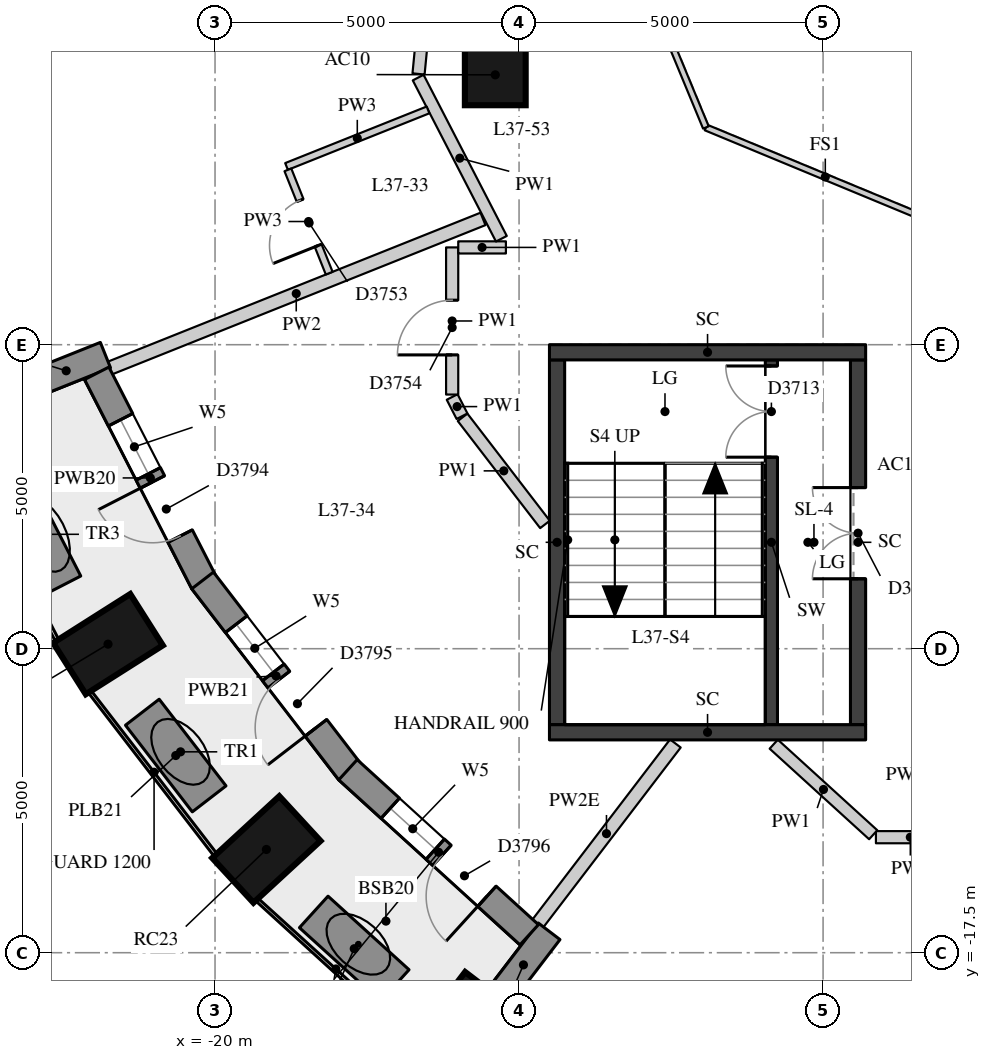
"""IFC4 building model, lengths in metres.
Left out: names, types, materials, properties, quantities, classifications, styles, units other than length and angle.
Written with IfcOpenShell. Run it as: python <this file> out.ifc"""

import sys

from ifc_helpers import new_model, si_unit, direction, frame, frame_2d, origin, origin_2d, place, context, subcontext, project, spatial, rectangle, extrude, element, fill, save


model = new_model("IFC4")
c1 = context("Model", 3, precision=1e-05, world=origin(), true_north=direction((0.0, 1.0)))
c2 = subcontext(c1, "Body", "Model", "MODEL_VIEW")
j1 = project(units=[si_unit("LENGTHUNIT", "METRE"), si_unit("PLANEANGLEUNIT", "RADIAN")], contexts=[c1])
p1 = place(None, origin())
s1 = spatial("IfcSite", under=j1, at=p1, CompositionType="ELEMENT")
p2 = place(p1, origin())
s2 = spatial("IfcBuilding", under=s1, at=p2, CompositionType="ELEMENT")
p3 = place(p2, frame((0.0, 0.0, 131.8)))
s3 = spatial("IfcBuildingStorey", under=s2, at=p3, CompositionType="ELEMENT", Elevation=131.8)
for number, where, z_axis, x_axis in (
    (1, (-21.76, -12.425, 0.0), (0.0, 0.0, 1.0), (-0.845, -0.536, 0.0)),
    (2, (-19.156, -15.802, 0.0), (0.0, 0.0, 1.0), (-0.735, -0.678, 0.0)),
    (3, (-15.945, -18.717, 0.0), (0.0, 0.0, 1.0), (-0.607, -0.795, 0.0)),
):
    element("IfcColumn", number, at=place(p3, frame(where, z_axis=z_axis, x_axis=x_axis)), inside=s3, PredefinedType="COLUMN", context=c2, shape_type="SweptSolid", body=[
        extrude(rectangle(XDim=1.5, YDim=1.0, at=origin_2d()), origin(), (0.0, 0.0, 1.0), 3.3),
    ])
p4 = place(p3, frame((-15.391, -3.062, 0.0), z_axis=(0.0, 0.0, 1.0), x_axis=(1.0, 0.0, 0.0)))
e4 = element("IfcColumn", 4, at=p4, inside=s3, PredefinedType="COLUMN", context=c2, shape_type="SweptSolid", body=[
    extrude(rectangle(XDim=1.0, YDim=1.0, at=origin_2d()), origin(), (0.0, 0.0, 1.0), 3.3),
])
p5 = place(p3, frame((-23.093, -8.187, 0.0), z_axis=(0.0, 0.0, 1.0), x_axis=(0.928549333349, 0.371209018665, 0.0)))
e5 = element("IfcWall", 5, at=p5, inside=s3, PredefinedType="SOLIDWALL", context=c2, shape_type="SweptSolid", body=[
    extrude(rectangle(XDim=1.39, YDim=0.45, at=frame_2d((0.695, 0.0))), origin(), (0.0, 0.0, 1.0), 2.85),
])
p6 = place(p3, frame((-15.35, -18.253, 0.0), z_axis=(0.0, 0.0, 1.0), x_axis=(0.607026495834, 0.794681592435, 0.0)))
e6 = element("IfcWall", 6, at=p6, inside=s3, PredefinedType="SOLIDWALL", context=c2, shape_type="SweptSolid", body=[
    extrude(rectangle(XDim=1.391, YDim=0.45, at=frame_2d((0.695, 0.0))), origin(), (0.0, 0.0, 1.0), 2.4),
])
p7 = place(p3, frame((-21.945, -7.97, 0.0), z_axis=(0.0, 0.0, 1.0), x_axis=(0.455905146579, -0.89002836883, 0.0)))
e7 = element("IfcWall", 7, at=p7, inside=s3, PredefinedType="SOLIDWALL", context=c2, shape_type="SweptSolid", body=[
    extrude(rectangle(XDim=3.867, YDim=0.45, at=frame_2d((1.934, 0.0))), origin(), (0.0, 0.0, 1.0), 2.85),
])
p8 = place(p7, frame((0.858, 0.0, 0.4)))
e8 = element("IfcOpeningElement", 8, at=p8, cuts=e7, PredefinedType="OPENING", context=c2, shape_type="SweptSolid", body=[
    extrude(rectangle(XDim=1.0, YDim=1.75, at=frame_2d((0.5, 0.875))), frame((0.0, 0.235, 0.0), z_axis=(0.0, -1.0, 0.0), x_axis=(1.0, 0.0, 0.0)), (0.0, 0.0, 1.0), 0.47),
])
p9 = place(p7, frame((2.009, 0.0, 0.0)))
e9 = element("IfcOpeningElement", 9, at=p9, cuts=e7, PredefinedType="OPENING", context=c2, shape_type="SweptSolid", body=[
    extrude(rectangle(XDim=1.0, YDim=2.15, at=frame_2d((0.5, 1.075))), frame((0.0, 0.235, 0.0), z_axis=(0.0, -1.0, 0.0), x_axis=(1.0, 0.0, 0.0)), (0.0, 0.0, 1.0), 0.47),
])
p10 = place(p3, frame((-20.204, -11.377, 0.0), z_axis=(0.0, 0.0, 1.0), x_axis=(0.609698858135, -0.792633144897, 0.0)))
e10 = element("IfcWall", 10, at=p10, inside=s3, PredefinedType="SOLIDWALL", context=c2, shape_type="SweptSolid", body=[
    extrude(rectangle(XDim=3.965, YDim=0.45, at=frame_2d((1.982, 0.0))), origin(), (0.0, 0.0, 1.0), 2.85),
])
p11 = place(p10, frame((0.907, 0.0, 0.4)))
e11 = element("IfcOpeningElement", 11, at=p11, cuts=e10, PredefinedType="OPENING", context=c2, shape_type="SweptSolid", body=[
    extrude(rectangle(XDim=1.0, YDim=1.75, at=frame_2d((0.5, 0.875))), frame((0.0, 0.235, 0.0), z_axis=(0.0, -1.0, 0.0), x_axis=(1.0, 0.0, 0.0)), (0.0, 0.0, 1.0), 0.47),
])
p12 = place(p10, frame((2.058, 0.0, 0.0)))
e12 = element("IfcOpeningElement", 12, at=p12, cuts=e10, PredefinedType="OPENING", context=c2, shape_type="SweptSolid", body=[
    extrude(rectangle(XDim=1.0, YDim=2.15, at=frame_2d((0.5, 1.075))), frame((0.0, 0.235, 0.0), z_axis=(0.0, -1.0, 0.0), x_axis=(1.0, 0.0, 0.0)), (0.0, 0.0, 1.0), 0.47),
])
p13 = place(p3, frame((-17.814, -14.491, 0.0), z_axis=(0.0, 0.0, 1.0), x_axis=(0.73951517403, -0.673139886933, 0.0)))
e13 = element("IfcWall", 13, at=p13, inside=s3, PredefinedType="SOLIDWALL", context=c2, shape_type="SweptSolid", body=[
    extrude(rectangle(XDim=4.031, YDim=0.45, at=frame_2d((2.016, 0.0))), origin(), (0.0, 0.0, 1.0), 2.85),
])
p14 = place(p13, frame((0.941, 0.0, 0.4)))
e14 = element("IfcOpeningElement", 14, at=p14, cuts=e13, PredefinedType="OPENING", context=c2, shape_type="SweptSolid", body=[
    extrude(rectangle(XDim=1.0, YDim=1.75, at=frame_2d((0.5, 0.875))), frame((0.0, 0.235, 0.0), z_axis=(0.0, -1.0, 0.0), x_axis=(1.0, 0.0, 0.0)), (0.0, 0.0, 1.0), 0.47),
])
p15 = place(p13, frame((2.091, 0.0, 0.0)))
e15 = element("IfcOpeningElement", 15, at=p15, cuts=e13, PredefinedType="OPENING", context=c2, shape_type="SweptSolid", body=[
    extrude(rectangle(XDim=1.0, YDim=2.15, at=frame_2d((0.5, 1.075))), frame((0.0, 0.235, 0.0), z_axis=(0.0, -1.0, 0.0), x_axis=(1.0, 0.0, 0.0)), (0.0, 0.0, 1.0), 0.47),
])
p16 = place(p3, frame((-23.342, -9.864, 0.0), z_axis=(0.0, 0.0, 1.0), x_axis=(0.456845298981, -0.88954616114, 0.0)))
e16 = element("IfcWall", 16, at=p16, inside=s3, PredefinedType="USERDEFINED", context=c2, shape_type="SweptSolid", body=[
    extrude(rectangle(XDim=1.8, YDim=0.7, at=frame_2d((0.9, 0.0))), origin(), (0.0, 0.0, 1.0), 0.75),
])
p17 = place(p3, frame((-21.196, -13.544, 0.0), z_axis=(0.0, 0.0, 1.0), x_axis=(0.610686846919, -0.791872196127, 0.0)))
e17 = element("IfcWall", 17, at=p17, inside=s3, PredefinedType="USERDEFINED", context=c2, shape_type="SweptSolid", body=[
    extrude(rectangle(XDim=1.8, YDim=0.7, at=frame_2d((0.9, 0.0))), origin(), (0.0, 0.0, 1.0), 0.75),
])
p18 = place(p3, frame((-18.377, -16.829, 0.0), z_axis=(0.0, 0.0, 1.0), x_axis=(0.740332755969, -0.6722405897, 0.0)))
e18 = element("IfcWall", 18, at=p18, inside=s3, PredefinedType="USERDEFINED", context=c2, shape_type="SweptSolid", body=[
    extrude(rectangle(XDim=1.8, YDim=0.7, at=frame_2d((0.9, 0.0))), origin(), (0.0, 0.0, 1.0), 0.75),
])
p19 = place(p3, frame((-10.85, -13.75, 0.0), z_axis=(0.0, 0.0, 1.0), x_axis=(0.0, 1.0, 0.0)))
e19 = element("IfcWall", 19, at=p19, inside=s3, PredefinedType="SHEAR", context=c2, shape_type="SweptSolid", body=[
    extrude(rectangle(XDim=6.0, YDim=0.2, at=frame_2d((3.0, 0.0))), origin(), (0.0, 0.0, 1.0), 2.85),
])
p20 = place(p19, frame((4.4, 0.0, 0.0)))
e20 = element("IfcOpeningElement", 20, at=p20, cuts=e19, PredefinedType="OPENING", context=c2, shape_type="SweptSolid", body=[
    extrude(rectangle(XDim=1.5, YDim=2.1, at=frame_2d((0.75, 1.05))), frame((0.0, 0.11, 0.0), z_axis=(0.0, -1.0, 0.0), x_axis=(1.0, 0.0, 0.0)), (0.0, 0.0, 1.0), 0.22),
])
p21 = place(p3, frame((-14.375, -13.75, -0.28), z_axis=(0.0, 0.0, 1.0), x_axis=(0.0, 1.0, 0.0)))
e21 = element("IfcWall", 21, at=p21, inside=s3, PredefinedType="SHEAR", context=c2, shape_type="SweptSolid", body=[
    extrude(rectangle(XDim=6.0, YDim=0.25, at=frame_2d((3.0, 0.0))), origin(), (0.0, 0.0, 1.0), 3.13),
])
p22 = place(p3, frame((-9.425, -13.75, -0.28), z_axis=(0.0, 0.0, 1.0), x_axis=(0.0, 1.0, 0.0)))
e22 = element("IfcWall", 22, at=p22, inside=s3, PredefinedType="SHEAR", context=c2, shape_type="SweptSolid", body=[
    extrude(rectangle(XDim=6.0, YDim=0.25, at=frame_2d((3.0, 0.0))), origin(), (0.0, 0.0, 1.0), 3.13),
])
p23 = place(p22, frame((2.4, 0.0, 0.28)))
e23 = element("IfcOpeningElement", 23, at=p23, cuts=e22, PredefinedType="OPENING", context=c2, shape_type="SweptSolid", body=[
    extrude(rectangle(XDim=1.5, YDim=2.1, at=frame_2d((0.75, 1.05))), frame((0.0, 0.135, 0.0), z_axis=(0.0, -1.0, 0.0), x_axis=(1.0, 0.0, 0.0)), (0.0, 0.0, 1.0), 0.27),
])
for number, where, z_axis, x_axis in (
    (24, (-14.5, -7.625, -0.28), (0.0, 0.0, 1.0), (1.0, 0.0, 0.0)),
    (25, (-14.5, -13.875, -0.28), (0.0, 0.0, 1.0), (1.0, 0.0, 0.0)),
):
    element("IfcWall", number, at=place(p3, frame(where, z_axis=z_axis, x_axis=x_axis)), inside=s3, PredefinedType="SHEAR", context=c2, shape_type="SweptSolid", body=[
        extrude(rectangle(XDim=5.2, YDim=0.25, at=frame_2d((2.6, 0.0))), origin(), (0.0, 0.0, 1.0), 3.13),
    ])
p24 = place(p3, frame((-14.573, -10.456, 0.0), z_axis=(0.0, 0.0, 1.0), x_axis=(-0.60967360535, 0.792652568872, 0.0)))
e26 = element("IfcWall", 26, at=p24, inside=s3, PredefinedType="PARTITIONING", context=c2, shape_type="SweptSolid", body=[
    extrude(rectangle(XDim=2.223, YDim=0.2, at=frame_2d((1.111, 0.0))), origin(), (0.0, 0.0, 1.0), 2.85),
])
p25 = place(p3, frame((-15.938, -8.676, 0.0), z_axis=(0.0, 0.0, 1.0), x_axis=(-0.456525695549, 0.889710227717, 0.0)))
e27 = element("IfcWall", 27, at=p25, inside=s3, PredefinedType="PARTITIONING", context=c2, shape_type="SweptSolid", body=[
    extrude(rectangle(XDim=0.356, YDim=0.2, at=frame_2d((0.178, 0.0))), origin(), (0.0, 0.0, 1.0), 2.85),
])
p26 = place(p3, frame((-16.1, -8.32, 0.0), z_axis=(0.0, 0.0, 1.0), x_axis=(0.0, 1.0, 0.0)))
e28 = element("IfcWall", 28, at=p26, inside=s3, PredefinedType="PARTITIONING", context=c2, shape_type="SweptSolid", body=[
    extrude(rectangle(XDim=2.42, YDim=0.2, at=frame_2d((1.21, 0.0))), origin(), (0.0, 0.0, 1.0), 2.85),
])
p27 = place(p26, frame((0.652, 0.0, 0.0)))
e29 = element("IfcOpeningElement", 29, at=p27, cuts=e28, PredefinedType="OPENING", context=c2, shape_type="SweptSolid", body=[
    extrude(rectangle(XDim=0.9, YDim=2.1, at=frame_2d((0.45, 1.05))), frame((0.0, 0.11, 0.0), z_axis=(0.0, -1.0, 0.0), x_axis=(1.0, 0.0, 0.0)), (0.0, 0.0, 1.0), 0.22),
])
p28 = place(p3, frame((-16.0, -5.9, 0.0), z_axis=(0.0, 0.0, 1.0), x_axis=(1.0, 0.0, 0.0)))
e30 = element("IfcWall", 30, at=p28, inside=s3, PredefinedType="PARTITIONING", context=c2, shape_type="SweptSolid", body=[
    extrude(rectangle(XDim=0.784, YDim=0.2, at=frame_2d((0.392, 0.0))), origin(), (0.0, 0.0, 1.0), 2.85),
])
p29 = place(p3, frame((-15.291, -5.757, 0.0), z_axis=(0.0, 0.0, 1.0), x_axis=(-0.45873256191, 0.888574384418, 0.0)))
e31 = element("IfcWall", 31, at=p29, inside=s3, PredefinedType="PARTITIONING", context=c2, shape_type="SweptSolid", body=[
    extrude(rectangle(XDim=2.983, YDim=0.2, at=frame_2d((1.491, 0.0))), origin(), (0.0, 0.0, 1.0), 2.85),
])
p30 = place(p3, frame((-16.653, -3.047, 0.0), z_axis=(0.0, 0.0, 1.0), x_axis=(0.096559879606, 0.995327177189, 0.0)))
e32 = element("IfcWall", 32, at=p30, inside=s3, PredefinedType="PARTITIONING", context=c2, shape_type="SweptSolid", body=[
    extrude(rectangle(XDim=7.449, YDim=0.2, at=frame_2d((3.724, 0.0))), origin(), (0.0, 0.0, 1.0), 2.35),
])
p31 = place(p30, frame((0.864, 0.0, 0.0)))
e33 = element("IfcOpeningElement", 33, at=p31, cuts=e32, PredefinedType="OPENING", context=c2, shape_type="SweptSolid", body=[
    extrude(rectangle(XDim=1.1, YDim=2.1, at=frame_2d((0.55, 1.05))), frame((0.0, 0.11, 0.0), z_axis=(0.0, -1.0, 0.0), x_axis=(1.0, 0.0, 0.0)), (0.0, 0.0, 1.0), 0.22),
])
p32 = place(p3, frame((-8.0, -15.6, 0.0), z_axis=(0.0, 0.0, 1.0), x_axis=(-1.0, 0.0, 0.0)))
e34 = element("IfcWall", 34, at=p32, inside=s3, PredefinedType="PARTITIONING", context=c2, shape_type="SweptSolid", body=[
    extrude(rectangle(XDim=1.131, YDim=0.2, at=frame_2d((0.565, 0.0))), origin(), (0.0, 0.0, 1.0), 2.85),
])
p33 = place(p3, frame((-9.176, -15.56, 0.0), z_axis=(0.0, 0.0, 1.0), x_axis=(-0.73943556447, 0.673227336044, 0.0)))
e35 = element("IfcWall", 35, at=p33, inside=s3, PredefinedType="PARTITIONING", context=c2, shape_type="SweptSolid", body=[
    extrude(rectangle(XDim=2.212, YDim=0.2, at=frame_2d((1.106, 0.0))), origin(), (0.0, 0.0, 1.0), 2.85),
])
p34 = place(p3, frame((-21.736, -7.887, 0.0), z_axis=(0.0, 0.0, 1.0), x_axis=(0.928547942842, 0.371212496884, 0.0)))
e36 = element("IfcWall", 36, at=p34, inside=s3, PredefinedType="PARTITIONING", context=c2, shape_type="SweptSolid", body=[
    extrude(rectangle(XDim=6.615, YDim=0.22, at=frame_2d((3.308, 0.0))), origin(), (0.0, 0.0, 1.0), 2.85),
])
p35 = place(p3, frame((-14.696, -17.025, 0.0), z_axis=(0.0, 0.0, 1.0), x_axis=(0.607059278405, 0.794656550028, 0.0)))
e37 = element("IfcWall", 37, at=p35, inside=s3, PredefinedType="PARTITIONING", context=c2, shape_type="SweptSolid", body=[
    extrude(rectangle(XDim=3.734, YDim=0.22, at=frame_2d((1.867, 0.0))), origin(), (0.0, 0.0, 1.0), 2.4),
])
p36 = place(p3, frame((-16.497, -3.638, 0.0), z_axis=(0.0, 0.0, 1.0), x_axis=(-0.92857071808, -0.371155522019, 0.0)))
e38 = element("IfcWall", 38, at=p36, inside=s3, PredefinedType="PARTITIONING", context=c2, shape_type="SweptSolid", body=[
    extrude(rectangle(XDim=2.506, YDim=0.12, at=frame_2d((1.253, 0.0))), origin(), (0.0, 0.0, 1.0), 2.85),
])
p37 = place(p3, frame((-18.802, -4.624, 0.0), z_axis=(0.0, 0.0, 1.0), x_axis=(0.371229680537, -0.928541073022, 0.0)))
e39 = element("IfcWall", 39, at=p37, inside=s3, PredefinedType="PARTITIONING", context=c2, shape_type="SweptSolid", body=[
    extrude(rectangle(XDim=1.83, YDim=0.12, at=frame_2d((0.915, 0.0))), origin(), (0.0, 0.0, 1.0), 2.85),
])
p38 = place(p37, frame((0.54, 0.0, 0.0)))
e40 = element("IfcOpeningElement", 40, at=p38, cuts=e39, PredefinedType="OPENING", context=c2, shape_type="SweptSolid", body=[
    extrude(rectangle(XDim=0.8, YDim=2.1, at=frame_2d((0.4, 1.05))), frame((0.0, 0.07, 0.0), z_axis=(0.0, -1.0, 0.0), x_axis=(1.0, 0.0, 0.0)), (0.0, 0.0, 1.0), 0.14),
])
for number, where, z_axis, x_axis in (
    (41, (-8.0, -5.554, 0.0), (0.0, 0.0, 1.0), (-0.924, 0.383, 0.0)),
    (42, (-11.927, -3.927, 0.0), (0.0, 0.0, 1.0), (-0.383, 0.924, 0.0)),
):
    element("IfcWall", number, at=place(p3, frame(where, z_axis=z_axis, x_axis=x_axis)), inside=s3, PredefinedType="PARTITIONING", context=c2, shape_type="SweptSolid", body=[
        extrude(rectangle(XDim=4.251, YDim=0.1, at=frame_2d((2.125, 0.0))), origin(), (0.0, 0.0, 1.0), 2.85),
    ])
p39 = place(p8, origin())
e43 = element("IfcWindow", 43, at=p39, inside=s3, PartitioningType="SINGLE_PANEL", PredefinedType="WINDOW", context=c2, shape_type="SweptSolid", body=[
    extrude(rectangle(XDim=1.0, YDim=1.75, at=frame_2d((0.5, 0.875))), frame((0.0, 0.035, 0.0), z_axis=(0.0, -1.0, 0.0), x_axis=(1.0, 0.0, 0.0)), (0.0, 0.0, 1.0), 0.06),
])
fill(e8, e43)
p40 = place(p9, frame((1.0, 0.0, 0.0), z_axis=(0.0, 0.0, 1.0), x_axis=(-1.0, 0.0, 0.0)))
e44 = element("IfcDoor", 44, at=p40, inside=s3, OperationType="SINGLE_SWING_RIGHT", PredefinedType="DOOR", context=c2, shape_type="SweptSolid", body=[
    extrude(rectangle(XDim=1.0, YDim=2.15, at=frame_2d((0.5, 1.075))), frame((0.0, 0.075, 0.0), z_axis=(0.0, -1.0, 0.0), x_axis=(1.0, 0.0, 0.0)), (0.0, 0.0, 1.0), 0.05),
])
fill(e9, e44)
p41 = place(p11, origin())
e45 = element("IfcWindow", 45, at=p41, inside=s3, PartitioningType="SINGLE_PANEL", PredefinedType="WINDOW", context=c2, shape_type="SweptSolid", body=[
    extrude(rectangle(XDim=1.0, YDim=1.75, at=frame_2d((0.5, 0.875))), frame((0.0, 0.035, 0.0), z_axis=(0.0, -1.0, 0.0), x_axis=(1.0, 0.0, 0.0)), (0.0, 0.0, 1.0), 0.06),
])
fill(e11, e45)
p42 = place(p12, frame((1.0, 0.0, 0.0), z_axis=(0.0, 0.0, 1.0), x_axis=(-1.0, 0.0, 0.0)))
e46 = element("IfcDoor", 46, at=p42, inside=s3, OperationType="SINGLE_SWING_LEFT", PredefinedType="DOOR", context=c2, shape_type="SweptSolid", body=[
    extrude(rectangle(XDim=1.0, YDim=2.15, at=frame_2d((0.5, 1.075))), frame((0.0, 0.075, 0.0), z_axis=(0.0, -1.0, 0.0), x_axis=(1.0, 0.0, 0.0)), (0.0, 0.0, 1.0), 0.05),
])
fill(e12, e46)
p43 = place(p14, origin())
e47 = element("IfcWindow", 47, at=p43, inside=s3, PartitioningType="SINGLE_PANEL", PredefinedType="WINDOW", context=c2, shape_type="SweptSolid", body=[
    extrude(rectangle(XDim=1.0, YDim=1.75, at=frame_2d((0.5, 0.875))), frame((0.0, 0.035, 0.0), z_axis=(0.0, -1.0, 0.0), x_axis=(1.0, 0.0, 0.0)), (0.0, 0.0, 1.0), 0.06),
])
fill(e14, e47)
p44 = place(p15, frame((1.0, 0.0, 0.0), z_axis=(0.0, 0.0, 1.0), x_axis=(-1.0, 0.0, 0.0)))
e48 = element("IfcDoor", 48, at=p44, inside=s3, OperationType="SINGLE_SWING_LEFT", PredefinedType="DOOR", context=c2, shape_type="SweptSolid", body=[
    extrude(rectangle(XDim=1.0, YDim=2.15, at=frame_2d((0.5, 1.075))), frame((0.0, 0.075, 0.0), z_axis=(0.0, -1.0, 0.0), x_axis=(1.0, 0.0, 0.0)), (0.0, 0.0, 1.0), 0.05),
])
fill(e15, e48)
p45 = place(p20, origin())
e49 = element("IfcDoor", 49, at=p45, inside=s3, OperationType="DOUBLE_DOOR_SINGLE_SWING", PredefinedType="DOOR", context=c2, shape_type="SweptSolid", body=[
    extrude(rectangle(XDim=1.5, YDim=2.1, at=frame_2d((0.75, 1.05))), frame((0.0, 0.025, 0.0), z_axis=(0.0, -1.0, 0.0), x_axis=(1.0, 0.0, 0.0)), (0.0, 0.0, 1.0), 0.05),
])
fill(e20, e49)
p46 = place(p23, origin())
e50 = element("IfcDoor", 50, at=p46, inside=s3, OperationType="DOUBLE_DOOR_SINGLE_SWING", PredefinedType="DOOR", context=c2, shape_type="SweptSolid", body=[
    extrude(rectangle(XDim=1.5, YDim=2.1, at=frame_2d((0.75, 1.05))), frame((0.0, 0.025, 0.0), z_axis=(0.0, -1.0, 0.0), x_axis=(1.0, 0.0, 0.0)), (0.0, 0.0, 1.0), 0.05),
])
fill(e23, e50)
p47 = place(p38, origin())
e51 = element("IfcDoor", 51, at=p47, inside=s3, OperationType="SINGLE_SWING_LEFT", PredefinedType="DOOR", context=c2, shape_type="SweptSolid", body=[
    extrude(rectangle(XDim=0.8, YDim=2.1, at=frame_2d((0.4, 1.05))), frame((0.0, 0.025, 0.0), z_axis=(0.0, -1.0, 0.0), x_axis=(1.0, 0.0, 0.0)), (0.0, 0.0, 1.0), 0.05),
])
fill(e40, e51)
p48 = place(p27, origin())
e52 = element("IfcDoor", 52, at=p48, inside=s3, OperationType="SINGLE_SWING_LEFT", PredefinedType="DOOR", context=c2, shape_type="SweptSolid", body=[
    extrude(rectangle(XDim=0.9, YDim=2.1, at=frame_2d((0.45, 1.05))), frame((0.0, 0.025, 0.0), z_axis=(0.0, -1.0, 0.0), x_axis=(1.0, 0.0, 0.0)), (0.0, 0.0, 1.0), 0.05),
])
fill(e29, e52)
save(model, sys.argv[1])
